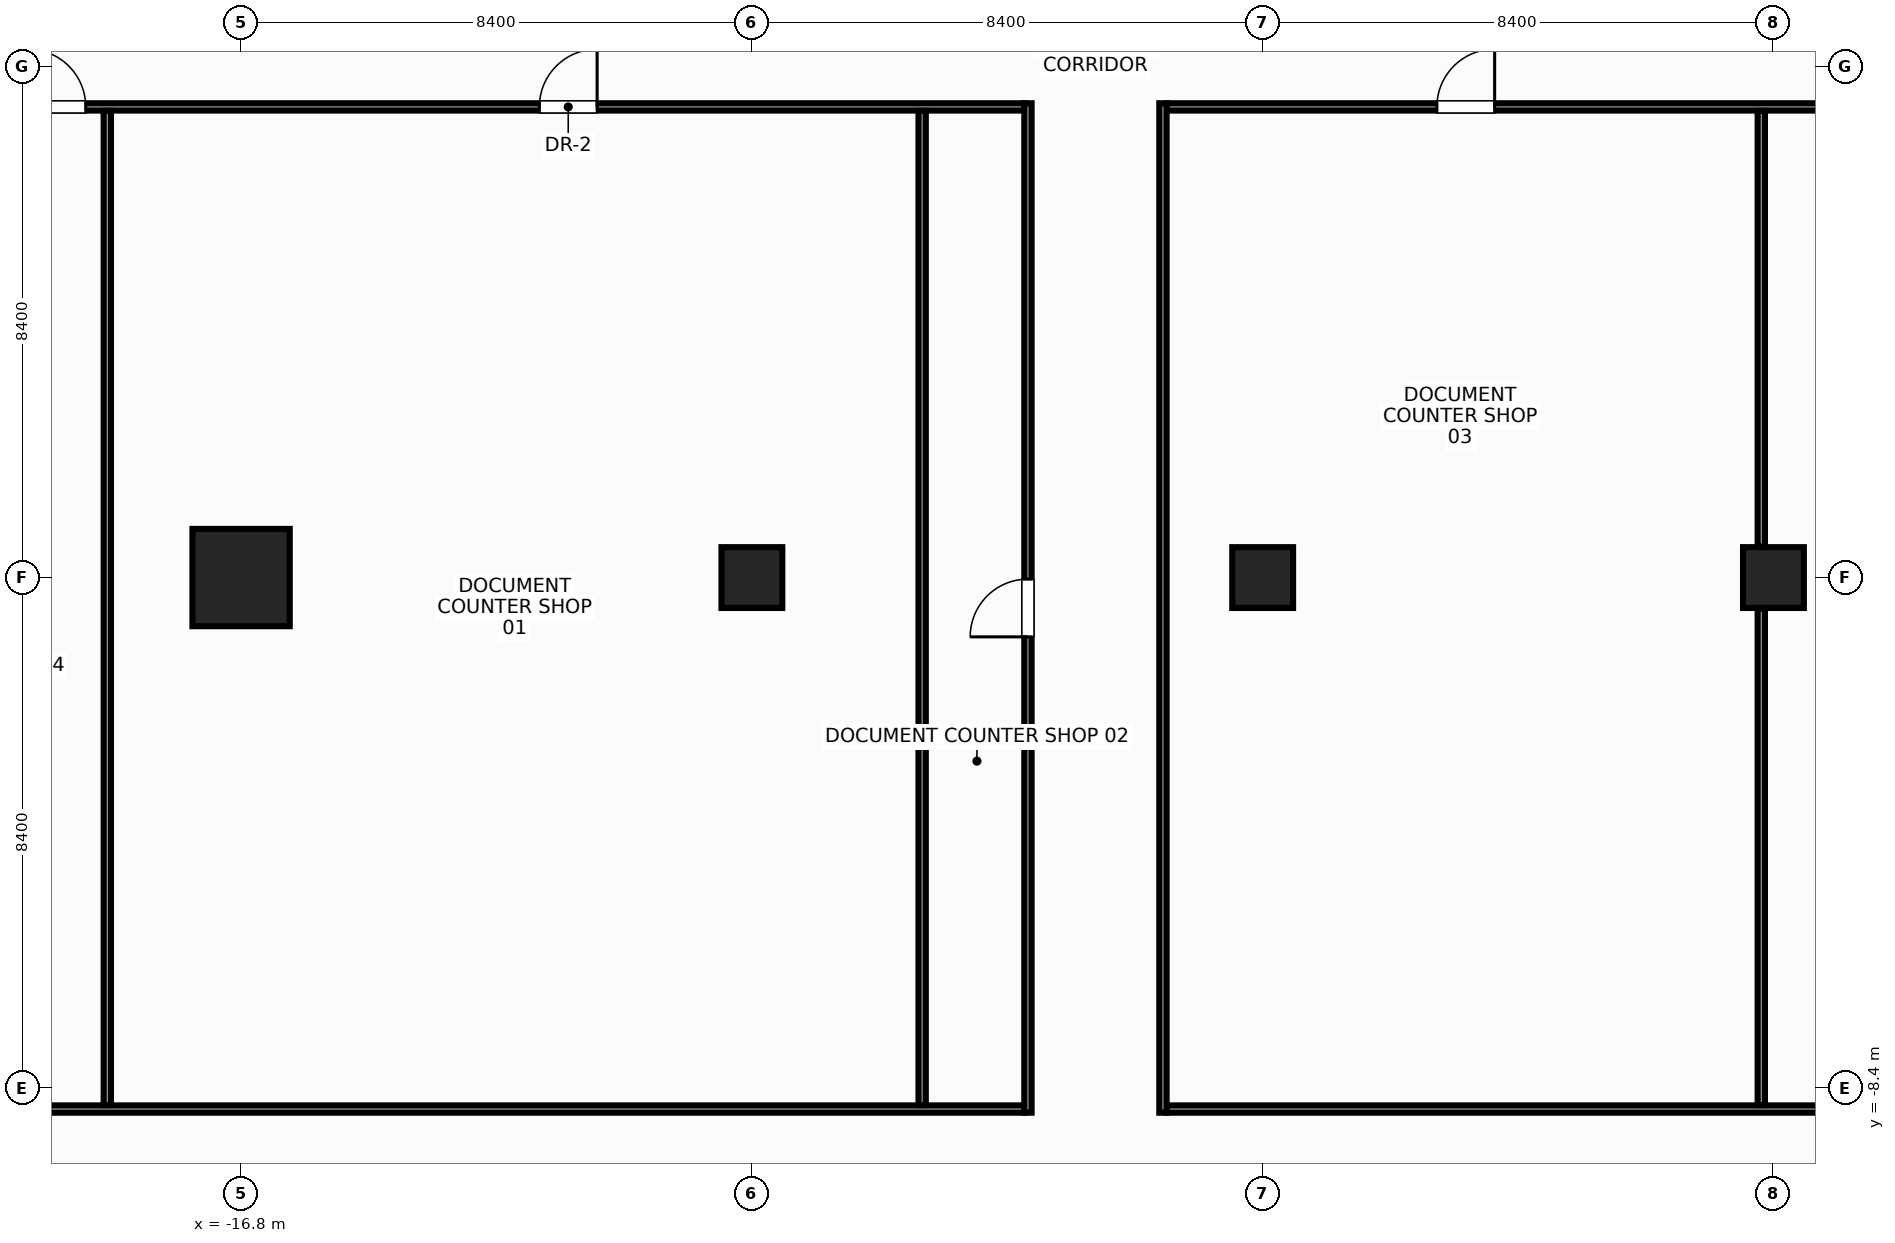
"""IFC4 building model, lengths in metres.
Left out: names, types, materials, properties, quantities, classifications, styles, units other than length and angle.
Written with IfcOpenShell. Run it as: python <this file> out.ifc"""

import sys

from ifc_helpers import new_model, si_unit, direction, frame, frame_2d, origin, origin_with_axes, origin_2d, place, context, subcontext, project, spatial, rectangle, hollow_rectangle, extrude, source, transform, mapped, element, fill, save


model = new_model("IFC4")
c1 = context("Model", 3, precision=1e-05, world=origin(), true_north=direction((0.0, 1.0)))
c2 = subcontext(c1, "Body", "Model", "MODEL_VIEW")
j1 = project(units=[si_unit("LENGTHUNIT", "METRE"), si_unit("PLANEANGLEUNIT", "RADIAN")], contexts=[c1])
p1 = place(None, origin())
s1 = spatial("IfcSite", under=j1, at=p1, CompositionType="ELEMENT")
p2 = place(p1, origin())
s2 = spatial("IfcBuilding", under=s1, at=p2, CompositionType="ELEMENT")
p3 = place(p2, frame((0.0, 0.0, 88.4)))
s3 = spatial("IfcBuildingStorey", under=s2, at=p3, CompositionType="ELEMENT", Elevation=88.4)
m1 = source(origin(), c2, "Body", "SweptSolid", [
    extrude(rectangle(XDim=1.6, YDim=1.6, at=origin_2d()), origin(), (0.0, 0.0, 1.0), 3.6),
])
p4 = place(p3, frame((-16.8, 0.0, 0.0), z_axis=(0.0, 0.0, 1.0), x_axis=(1.0, 0.0, 0.0)))
e1 = element("IfcColumn", 1, at=p4, inside=s3, PredefinedType="COLUMN", context=c2, shape_type="MappedRepresentation", body=[
    mapped(m1, transform((0.0, 0.0, 0.0), x_axis=(1.0, 0.0, 0.0), y_axis=(0.0, 1.0, 0.0), z_axis=(0.0, 0.0, 1.0), scale=1.0)),
])
m2 = source(origin(), c2, "Body", "SweptSolid", [
    extrude(hollow_rectangle(XDim=1.0, YDim=1.0, WallThickness=0.045, at=origin_2d()), origin(), (0.0, 0.0, 1.0), 3.6),
])
for number, where, z_axis, x_axis in (
    (2, (-8.4, 0.0, 0.0), (0.0, 0.0, 1.0), (1.0, 0.0, 0.0)),
    (3, (8.4, 0.0, 0.0), (0.0, 0.0, 1.0), (1.0, 0.0, 0.0)),
):
    element("IfcColumn", number, at=place(p3, frame(where, z_axis=z_axis, x_axis=x_axis)), inside=s3, PredefinedType="COLUMN", context=c2, shape_type="MappedRepresentation", body=[
        mapped(m2, transform((0.0, 0.0, 0.0), x_axis=(1.0, 0.0, 0.0), y_axis=(0.0, 1.0, 0.0), z_axis=(0.0, 0.0, 1.0), scale=1.0)),
    ])
m3 = source(origin(), c2, "Body", "SweptSolid", [
    extrude(rectangle(XDim=1.0, YDim=1.0, at=origin_2d()), origin(), (0.0, 0.0, 1.0), 3.6),
])
p5 = place(p3, origin_with_axes())
e4 = element("IfcColumn", 4, at=p5, inside=s3, PredefinedType="COLUMN", context=c2, shape_type="MappedRepresentation", body=[
    mapped(m3, transform((0.0, 0.0, 0.0), x_axis=(1.0, 0.0, 0.0), y_axis=(0.0, 1.0, 0.0), z_axis=(0.0, 0.0, 1.0), scale=1.0)),
])
m4 = source(origin(), c2, "Body", "SweptSolid", [
    extrude(rectangle(XDim=16.8, YDim=0.12, at=frame_2d((8.4, 0.0))), origin(), (0.0, 0.0, 1.0), 2.745),
])
p6 = place(p3, frame((-20.72, 7.74, 0.0), z_axis=(0.0, 0.0, 1.0), x_axis=(1.0, 0.0, 0.0)))
e5 = element("IfcWall", 5, at=p6, inside=s3, PredefinedType="PARTITIONING", context=c2, shape_type="MappedRepresentation", body=[
    mapped(m4, transform((0.0, 0.0, 0.0), x_axis=(1.0, 0.0, 0.0), y_axis=(0.0, 1.0, 0.0), z_axis=(0.0, 0.0, 1.0), scale=1.0)),
])
p7 = place(p6, frame((8.825, 0.0, 0.0)))
e6 = element("IfcOpeningElement", 6, at=p7, cuts=e5, PredefinedType="OPENING", context=c2, shape_type="SweptSolid", body=[
    extrude(rectangle(XDim=0.95, YDim=2.15, at=frame_2d((0.475, 1.075))), frame((0.0, 0.072, 0.0), z_axis=(0.0, -1.0, 0.0), x_axis=(1.0, 0.0, 0.0)), (0.0, 0.0, 1.0), 0.144),
])
p8 = place(p6, frame((0.415, 0.0, 0.0)))
e7 = element("IfcOpeningElement", 7, at=p8, cuts=e5, PredefinedType="OPENING", context=c2, shape_type="SweptSolid", body=[
    extrude(rectangle(XDim=0.95, YDim=2.15, at=frame_2d((0.475, 1.075))), frame((0.0, 0.072, 0.0), z_axis=(0.0, -1.0, 0.0), x_axis=(1.0, 0.0, 0.0)), (0.0, 0.0, 1.0), 0.144),
])
m5 = source(origin(), c2, "Body", "SweptSolid", [
    extrude(rectangle(XDim=22.3, YDim=0.12, at=frame_2d((11.15, 0.0))), origin(), (0.0, 0.0, 1.0), 2.745),
])
p9 = place(p3, frame((-1.58, 7.74, 0.0), z_axis=(0.0, 0.0, 1.0), x_axis=(1.0, 0.0, 0.0)))
e8 = element("IfcWall", 8, at=p9, inside=s3, PredefinedType="PARTITIONING", context=c2, shape_type="MappedRepresentation", body=[
    mapped(m5, transform((0.0, 0.0, 0.0), x_axis=(1.0, 0.0, 0.0), y_axis=(0.0, 1.0, 0.0), z_axis=(0.0, 0.0, 1.0), scale=1.0)),
])
p10 = place(p9, frame((4.445, 0.0, 0.0)))
e9 = element("IfcOpeningElement", 9, at=p10, cuts=e8, PredefinedType="OPENING", context=c2, shape_type="SweptSolid", body=[
    extrude(rectangle(XDim=0.95, YDim=2.15, at=frame_2d((0.475, 1.075))), frame((0.0, 0.072, 0.0), z_axis=(0.0, -1.0, 0.0), x_axis=(1.0, 0.0, 0.0)), (0.0, 0.0, 1.0), 0.144),
])
p11 = place(p9, frame((15.535, 0.0, 0.0)))
e10 = element("IfcOpeningElement", 10, at=p11, cuts=e8, PredefinedType="OPENING", context=c2, shape_type="SweptSolid", body=[
    extrude(rectangle(XDim=0.95, YDim=2.15, at=frame_2d((0.475, 1.075))), frame((0.0, 0.072, 0.0), z_axis=(0.0, -1.0, 0.0), x_axis=(1.0, 0.0, 0.0)), (0.0, 0.0, 1.0), 0.144),
])
p12 = place(p3, frame((-20.72, -8.74, 0.0), z_axis=(0.0, 0.0, 1.0), x_axis=(1.0, 0.0, 0.0)))
e11 = element("IfcWall", 11, at=p12, inside=s3, PredefinedType="PARTITIONING", context=c2, shape_type="MappedRepresentation", body=[
    mapped(m4, transform((0.0, 0.0, 0.0), x_axis=(1.0, 0.0, 0.0), y_axis=(0.0, 1.0, 0.0), z_axis=(0.0, 0.0, 1.0), scale=1.0)),
])
p13 = place(p3, frame((-1.58, -8.74, 0.0), z_axis=(0.0, 0.0, 1.0), x_axis=(1.0, 0.0, 0.0)))
e12 = element("IfcWall", 12, at=p13, inside=s3, PredefinedType="PARTITIONING", context=c2, shape_type="MappedRepresentation", body=[
    mapped(m5, transform((0.0, 0.0, 0.0), x_axis=(1.0, 0.0, 0.0), y_axis=(0.0, 1.0, 0.0), z_axis=(0.0, 0.0, 1.0), scale=1.0)),
])
m6 = source(origin(), c2, "Body", "SweptSolid", [
    extrude(rectangle(XDim=16.6, YDim=0.12, at=frame_2d((8.3, 0.0))), origin(), (0.0, 0.0, 1.0), 2.645),
])
p14 = place(p3, frame((-3.86, -8.8, 0.0), z_axis=(0.0, 0.0, 1.0), x_axis=(0.0, 1.0, 0.0)))
e13 = element("IfcWall", 13, at=p14, inside=s3, PredefinedType="PARTITIONING", context=c2, shape_type="MappedRepresentation", body=[
    mapped(m6, transform((0.0, 0.0, 0.0), x_axis=(1.0, 0.0, 0.0), y_axis=(0.0, 1.0, 0.0), z_axis=(0.0, 0.0, 1.0), scale=1.0)),
])
p15 = place(p14, frame((7.825, 0.0, 0.0)))
e14 = element("IfcOpeningElement", 14, at=p15, cuts=e13, PredefinedType="OPENING", context=c2, shape_type="SweptSolid", body=[
    extrude(rectangle(XDim=0.95, YDim=2.15, at=frame_2d((0.475, 1.075))), frame((0.0, 0.072, 0.0), z_axis=(0.0, -1.0, 0.0), x_axis=(1.0, 0.0, 0.0)), (0.0, 0.0, 1.0), 0.144),
])
p16 = place(p3, frame((-1.64, -8.8, 0.0), z_axis=(0.0, 0.0, 1.0), x_axis=(0.0, 1.0, 0.0)))
e15 = element("IfcWall", 15, at=p16, inside=s3, PredefinedType="PARTITIONING", context=c2, shape_type="MappedRepresentation", body=[
    mapped(m6, transform((0.0, 0.0, 0.0), x_axis=(1.0, 0.0, 0.0), y_axis=(0.0, 1.0, 0.0), z_axis=(0.0, 0.0, 1.0), scale=1.0)),
])
m7 = source(origin(), c2, "Body", "SweptSolid", [
    extrude(rectangle(XDim=16.35, YDim=0.12, at=frame_2d((8.175, 0.0))), origin(), (0.0, 0.0, 1.0), 2.745),
])
p17 = place(p3, frame((-19.0, -8.675, 0.0), z_axis=(0.0, 0.0, 1.0), x_axis=(0.0, 1.0, 0.0)))
e16 = element("IfcWall", 16, at=p17, inside=s3, PredefinedType="PARTITIONING", context=c2, shape_type="MappedRepresentation", body=[
    mapped(m7, transform((0.0, 0.0, 0.0), x_axis=(1.0, 0.0, 0.0), y_axis=(0.0, 1.0, 0.0), z_axis=(0.0, 0.0, 1.0), scale=1.0)),
])
m8 = source(origin(), c2, "Body", "SweptSolid", [
    extrude(rectangle(XDim=16.35, YDim=0.12, at=frame_2d((8.175, 0.0))), origin(), (0.0, 0.0, 1.0), 2.645),
])
p18 = place(p3, frame((-5.6, -8.675, 0.0), z_axis=(0.0, 0.0, 1.0), x_axis=(0.0, 1.0, 0.0)))
e17 = element("IfcWall", 17, at=p18, inside=s3, PredefinedType="PARTITIONING", context=c2, shape_type="MappedRepresentation", body=[
    mapped(m8, transform((0.0, 0.0, 0.0), x_axis=(1.0, 0.0, 0.0), y_axis=(0.0, 1.0, 0.0), z_axis=(0.0, 0.0, 1.0), scale=1.0)),
])
m9 = source(origin(), c2, "Body", "SweptSolid", [
    extrude(rectangle(XDim=8.165, YDim=0.12, at=frame_2d((4.083, 0.0))), origin(), (0.0, 0.0, 1.0), 2.745),
])
p19 = place(p3, frame((8.2, -8.675, 0.0), z_axis=(0.0, 0.0, 1.0), x_axis=(0.0, 1.0, 0.0)))
e18 = element("IfcWall", 18, at=p19, inside=s3, PredefinedType="PARTITIONING", context=c2, shape_type="MappedRepresentation", body=[
    mapped(m9, transform((0.0, 0.0, 0.0), x_axis=(1.0, 0.0, 0.0), y_axis=(0.0, 1.0, 0.0), z_axis=(0.0, 0.0, 1.0), scale=1.0)),
])
m10 = source(origin(), c2, "Body", "SweptSolid", [
    extrude(rectangle(XDim=7.165, YDim=0.12, at=frame_2d((3.583, 0.0))), origin(), (0.0, 0.0, 1.0), 2.645),
])
p20 = place(p3, frame((8.2, 0.51, 0.0), z_axis=(0.0, 0.0, 1.0), x_axis=(0.0, 1.0, 0.0)))
e19 = element("IfcWall", 19, at=p20, inside=s3, PredefinedType="PARTITIONING", context=c2, shape_type="MappedRepresentation", body=[
    mapped(m10, transform((0.0, 0.0, 0.0), x_axis=(1.0, 0.0, 0.0), y_axis=(0.0, 1.0, 0.0), z_axis=(0.0, 0.0, 1.0), scale=1.0)),
])
m11 = source(origin(), c2, "Body", "SweptSolid", [
    extrude(rectangle(XDim=0.95, YDim=2.15, at=frame_2d((0.475, 1.075))), frame((0.0, 0.025, 0.0), z_axis=(0.0, -1.0, 0.0), x_axis=(1.0, 0.0, 0.0)), (0.0, 0.0, 1.0), 0.05),
])
p21 = place(p7, origin())
e20 = element("IfcDoor", 20, at=p21, inside=s3, OperationType="SINGLE_SWING_RIGHT", PredefinedType="DOOR", context=c2, shape_type="MappedRepresentation", body=[
    mapped(m11, transform((0.0, 0.0, 0.0), x_axis=(1.0, 0.0, 0.0), y_axis=(0.0, 1.0, 0.0), z_axis=(0.0, 0.0, 1.0), scale=1.0)),
])
fill(e6, e20)
p22 = place(p15, origin())
e21 = element("IfcDoor", 21, at=p22, inside=s3, OperationType="SINGLE_SWING_LEFT", PredefinedType="DOOR", context=c2, shape_type="MappedRepresentation", body=[
    mapped(m11, transform((0.0, 0.0, 0.0), x_axis=(1.0, 0.0, 0.0), y_axis=(0.0, 1.0, 0.0), z_axis=(0.0, 0.0, 1.0), scale=1.0)),
])
fill(e14, e21)
p23 = place(p10, origin())
e22 = element("IfcDoor", 22, at=p23, inside=s3, OperationType="SINGLE_SWING_RIGHT", PredefinedType="DOOR", context=c2, shape_type="MappedRepresentation", body=[
    mapped(m11, transform((0.0, 0.0, 0.0), x_axis=(1.0, 0.0, 0.0), y_axis=(0.0, 1.0, 0.0), z_axis=(0.0, 0.0, 1.0), scale=1.0)),
])
fill(e9, e22)
p24 = place(p8, origin())
e23 = element("IfcDoor", 23, at=p24, inside=s3, OperationType="SINGLE_SWING_LEFT", PredefinedType="DOOR", context=c2, shape_type="MappedRepresentation", body=[
    mapped(m11, transform((0.0, 0.0, 0.0), x_axis=(1.0, 0.0, 0.0), y_axis=(0.0, 1.0, 0.0), z_axis=(0.0, 0.0, 1.0), scale=1.0)),
])
fill(e7, e23)
save(model, sys.argv[1])
